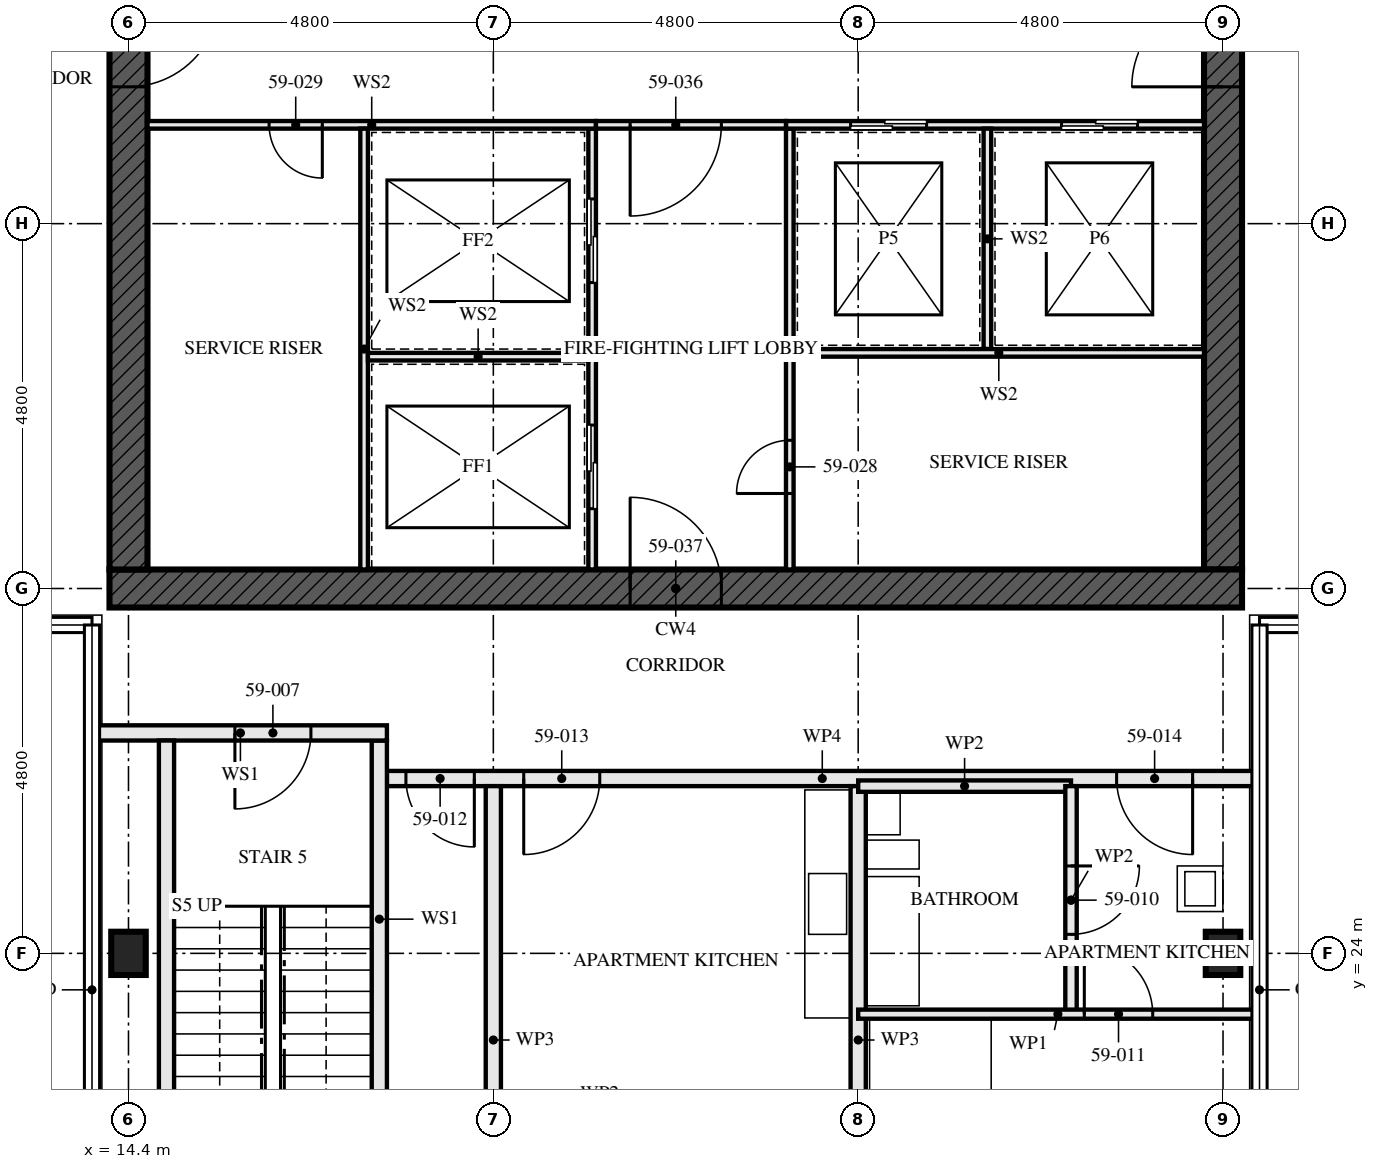
"""IFC4 building model, lengths in metres.
Left out: names, types, materials, properties, quantities, classifications, styles, units other than length and angle.
Written with IfcOpenShell. Run it as: python <this file> out.ifc"""

import sys

from ifc_helpers import new_model, si_unit, direction, frame, frame_2d, origin, origin_2d, place, context, subcontext, project, spatial, rectangle, i_section, extrude, element, fill, save


model = new_model("IFC4")
c1 = context("Model", 3, precision=1e-05, world=origin(), true_north=direction((0.0, 1.0)))
c2 = subcontext(c1, "Body", "Model", "MODEL_VIEW")
j1 = project(units=[si_unit("LENGTHUNIT", "METRE"), si_unit("PLANEANGLEUNIT", "RADIAN")], contexts=[c1])
p1 = place(None, origin())
s1 = spatial("IfcSite", under=j1, at=p1, CompositionType="ELEMENT")
p2 = place(p1, origin())
s2 = spatial("IfcBuilding", under=s1, at=p2, CompositionType="ELEMENT")
p3 = place(p2, frame((0.0, 0.0, 215.5)))
s3 = spatial("IfcBuildingStorey", under=s2, at=p3, CompositionType="ELEMENT", Elevation=215.5)
for number, where, z_axis, x_axis in (
    (1, (14.4, 24.0, 0.0), (0.0, 0.0, 1.0), (1.0, 0.0, 0.0)),
    (2, (28.8, 24.0, 0.0), (0.0, 0.0, 1.0), (1.0, 0.0, 0.0)),
):
    element("IfcColumn", number, at=place(p3, frame(where, z_axis=z_axis, x_axis=x_axis)), inside=s3, PredefinedType="COLUMN", context=c2, shape_type="SweptSolid", body=[
        extrude(i_section(OverallWidth=0.454, OverallDepth=0.569, WebThickness=0.078, FlangeThickness=0.125, FilletRadius=0.015, at=origin_2d()), origin(), (0.0, 0.0, 1.0), 3.5),
    ])
p4 = place(p3, frame((14.15, 28.8, -0.17), z_axis=(0.0, 0.0, 1.0), x_axis=(1.0, 0.0, 0.0)))
e3 = element("IfcWall", 3, at=p4, inside=s3, PredefinedType="SHEAR", context=c2, shape_type="SweptSolid", body=[
    extrude(rectangle(XDim=14.9, YDim=0.5, at=frame_2d((7.45, 0.0))), origin(), (0.0, 0.0, 1.0), 3.5),
])
p5 = place(p4, frame((6.85, 0.0, 0.17)))
e4 = element("IfcOpeningElement", 4, at=p5, cuts=e3, PredefinedType="OPENING", context=c2, shape_type="SweptSolid", body=[
    extrude(rectangle(XDim=1.2, YDim=2.1, at=frame_2d((0.6, 1.05))), frame((0.0, 0.26, 0.0), z_axis=(0.0, -1.0, 0.0), x_axis=(1.0, 0.0, 0.0)), (0.0, 0.0, 1.0), 0.521),
])
p6 = place(p3, frame((14.4, 42.95, -0.17), z_axis=(0.0, 0.0, 1.0), x_axis=(0.0, -1.0, 0.0)))
e5 = element("IfcWall", 5, at=p6, inside=s3, PredefinedType="SHEAR", context=c2, shape_type="SweptSolid", body=[
    extrude(rectangle(XDim=13.9, YDim=0.5, at=frame_2d((6.95, 0.0))), origin(), (0.0, 0.0, 1.0), 3.5),
])
p7 = place(p6, frame((6.35, 0.0, 0.17)))
e6 = element("IfcOpeningElement", 6, at=p7, cuts=e5, PredefinedType="OPENING", context=c2, shape_type="SweptSolid", body=[
    extrude(rectangle(XDim=1.2, YDim=2.1, at=frame_2d((0.6, 1.05))), frame((0.0, 0.26, 0.0), z_axis=(0.0, -1.0, 0.0), x_axis=(1.0, 0.0, 0.0)), (0.0, 0.0, 1.0), 0.521),
])
p8 = place(p3, frame((28.8, 29.05, -0.17), z_axis=(0.0, 0.0, 1.0), x_axis=(0.0, 1.0, 0.0)))
e7 = element("IfcWall", 7, at=p8, inside=s3, PredefinedType="SHEAR", context=c2, shape_type="SweptSolid", body=[
    extrude(rectangle(XDim=13.9, YDim=0.5, at=frame_2d((6.95, 0.0))), origin(), (0.0, 0.0, 1.0), 3.5),
])
p9 = place(p8, frame((6.35, 0.0, 0.17)))
e8 = element("IfcOpeningElement", 8, at=p9, cuts=e7, PredefinedType="OPENING", context=c2, shape_type="SweptSolid", body=[
    extrude(rectangle(XDim=1.2, YDim=2.1, at=frame_2d((0.6, 1.05))), frame((0.0, 0.26, 0.0), z_axis=(0.0, -1.0, 0.0), x_axis=(1.0, 0.0, 0.0)), (0.0, 0.0, 1.0), 0.521),
])
for number, where, z_axis, x_axis in (
    (9, (14.9, 22.1, 0.0), (0.0, 0.0, 1.0), (0.0, 1.0, 0.0)),
    (10, (17.7, 22.1, 0.0), (0.0, 0.0, 1.0), (0.0, 1.0, 0.0)),
):
    element("IfcWall", number, at=place(p3, frame(where, z_axis=z_axis, x_axis=x_axis)), inside=s3, PredefinedType="SOLIDWALL", context=c2, shape_type="SweptSolid", body=[
        extrude(rectangle(XDim=4.7, YDim=0.2, at=frame_2d((2.35, 0.0))), origin(), (0.0, 0.0, 1.0), 2.99),
    ])
p10 = place(p3, frame((13.945, 26.9, 0.0), z_axis=(0.0, 0.0, 1.0), x_axis=(1.0, 0.0, 0.0)))
e11 = element("IfcWall", 11, at=p10, inside=s3, PredefinedType="SOLIDWALL", context=c2, shape_type="SweptSolid", body=[
    extrude(rectangle(XDim=3.855, YDim=0.2, at=frame_2d((1.927, 0.0))), origin(), (0.0, 0.0, 1.0), 2.32),
])
p11 = place(p10, frame((1.855, 0.0, 0.0)))
e12 = element("IfcOpeningElement", 12, at=p11, cuts=e11, PredefinedType="OPENING", context=c2, shape_type="SweptSolid", body=[
    extrude(rectangle(XDim=1.0, YDim=2.1, at=frame_2d((0.5, 1.05))), frame((0.0, 0.111, 0.0), z_axis=(0.0, -1.0, 0.0), x_axis=(1.0, 0.0, 0.0)), (0.0, 0.0, 1.0), 0.221),
])
for number, where, z_axis, x_axis in (
    (13, (19.2, 19.52, 0.0), (0.0, 0.0, 1.0), (0.0, 1.0, 0.0)),
    (14, (24.0, 19.52, 0.0), (0.0, 0.0, 1.0), (0.0, 1.0, 0.0)),
):
    element("IfcWall", number, at=place(p3, frame(where, z_axis=z_axis, x_axis=x_axis)), inside=s3, PredefinedType="PARTITIONING", context=c2, shape_type="SweptSolid", body=[
        extrude(rectangle(XDim=6.68, YDim=0.2, at=frame_2d((3.34, 0.0))), origin(), (0.0, 0.0, 1.0), 2.55),
    ])
p12 = place(p3, frame((26.8, 23.2, 0.0), z_axis=(0.0, 0.0, 1.0), x_axis=(0.0, 1.0, 0.0)))
e15 = element("IfcWall", 15, at=p12, inside=s3, PredefinedType="PARTITIONING", context=c2, shape_type="SweptSolid", body=[
    extrude(rectangle(XDim=3.0, YDim=0.15, at=frame_2d((1.5, 0.0))), origin(), (0.0, 0.0, 1.0), 2.55),
])
p13 = place(p12, frame((1.05, 0.0, 0.0)))
e16 = element("IfcOpeningElement", 16, at=p13, cuts=e15, PredefinedType="OPENING", context=c2, shape_type="SweptSolid", body=[
    extrude(rectangle(XDim=0.9, YDim=2.1, at=frame_2d((0.45, 1.05))), frame((0.0, 0.085, 0.0), z_axis=(0.0, -1.0, 0.0), x_axis=(1.0, 0.0, 0.0)), (0.0, 0.0, 1.0), 0.171),
])
p14 = place(p3, frame((24.0, 26.2, 0.0), z_axis=(0.0, 0.0, 1.0), x_axis=(1.0, 0.0, 0.0)))
e17 = element("IfcWall", 17, at=p14, inside=s3, PredefinedType="PARTITIONING", context=c2, shape_type="SweptSolid", body=[
    extrude(rectangle(XDim=2.8, YDim=0.15, at=frame_2d((1.4, 0.0))), origin(), (0.0, 0.0, 1.0), 3.33),
])
p15 = place(p3, frame((24.0, 23.2, 0.0), z_axis=(0.0, 0.0, 1.0), x_axis=(1.0, 0.0, 0.0)))
e18 = element("IfcWall", 18, at=p15, inside=s3, PredefinedType="PARTITIONING", context=c2, shape_type="SweptSolid", body=[
    extrude(rectangle(XDim=5.255, YDim=0.12, at=frame_2d((2.627, 0.0))), origin(), (0.0, 0.0, 1.0), 2.32),
])
p16 = place(p15, frame((2.975, 0.0, 0.0)))
e19 = element("IfcOpeningElement", 19, at=p16, cuts=e18, PredefinedType="OPENING", context=c2, shape_type="SweptSolid", body=[
    extrude(rectangle(XDim=0.9, YDim=2.1, at=frame_2d((0.45, 1.05))), frame((0.0, 0.071, 0.0), z_axis=(0.0, -1.0, 0.0), x_axis=(1.0, 0.0, 0.0)), (0.0, 0.0, 1.0), 0.141),
])
p17 = place(p3, frame((17.8, 26.3, 0.0), z_axis=(0.0, 0.0, 1.0), x_axis=(1.0, 0.0, 0.0)))
e20 = element("IfcWall", 20, at=p17, inside=s3, PredefinedType="PARTITIONING", context=c2, shape_type="SweptSolid", body=[
    extrude(rectangle(XDim=11.455, YDim=0.2, at=frame_2d((5.728, 0.0))), origin(), (0.0, 0.0, 1.0), 2.32),
])
p18 = place(p17, frame((0.25, 0.0, 0.0)))
e21 = element("IfcOpeningElement", 21, at=p18, cuts=e20, PredefinedType="OPENING", context=c2, shape_type="SweptSolid", body=[
    extrude(rectangle(XDim=0.9, YDim=2.1, at=frame_2d((0.45, 1.05))), frame((0.0, 0.111, 0.0), z_axis=(0.0, -1.0, 0.0), x_axis=(1.0, 0.0, 0.0)), (0.0, 0.0, 1.0), 0.221),
])
p19 = place(p17, frame((1.8, 0.0, 0.0)))
e22 = element("IfcOpeningElement", 22, at=p19, cuts=e20, PredefinedType="OPENING", context=c2, shape_type="SweptSolid", body=[
    extrude(rectangle(XDim=1.0, YDim=2.1, at=frame_2d((0.5, 1.05))), frame((0.0, 0.111, 0.0), z_axis=(0.0, -1.0, 0.0), x_axis=(1.0, 0.0, 0.0)), (0.0, 0.0, 1.0), 0.221),
])
p20 = place(p17, frame((9.6, 0.0, 0.0)))
e23 = element("IfcOpeningElement", 23, at=p20, cuts=e20, PredefinedType="OPENING", context=c2, shape_type="SweptSolid", body=[
    extrude(rectangle(XDim=1.0, YDim=2.1, at=frame_2d((0.5, 1.05))), frame((0.0, 0.111, 0.0), z_axis=(0.0, -1.0, 0.0), x_axis=(1.0, 0.0, 0.0)), (0.0, 0.0, 1.0), 0.221),
])
p21 = place(p3, frame((20.5, 29.05, 0.0), z_axis=(0.0, 0.0, 1.0), x_axis=(0.0, 1.0, 0.0)))
e24 = element("IfcWall", 24, at=p21, inside=s3, PredefinedType="SOLIDWALL", context=c2, shape_type="SweptSolid", body=[
    extrude(rectangle(XDim=5.8, YDim=0.1, at=frame_2d((2.9, 0.0))), origin(), (0.0, 0.0, 1.0), 3.33),
])
p22 = place(p21, frame((0.8, 0.0, 0.0)))
e25 = element("IfcOpeningElement", 25, at=p22, cuts=e24, PredefinedType="OPENING", context=c2, shape_type="SweptSolid", body=[
    extrude(rectangle(XDim=1.1, YDim=2.3, at=frame_2d((0.55, 1.15))), frame((0.0, 0.061, 0.0), z_axis=(0.0, -1.0, 0.0), x_axis=(1.0, 0.0, 0.0)), (0.0, 0.0, 1.0), 0.121),
])
p23 = place(p21, frame((3.775, 0.0, 0.0)))
e26 = element("IfcOpeningElement", 26, at=p23, cuts=e24, PredefinedType="OPENING", context=c2, shape_type="SweptSolid", body=[
    extrude(rectangle(XDim=1.1, YDim=2.3, at=frame_2d((0.55, 1.15))), frame((0.0, 0.061, 0.0), z_axis=(0.0, -1.0, 0.0), x_axis=(1.0, 0.0, 0.0)), (0.0, 0.0, 1.0), 0.121),
])
p24 = place(p3, frame((23.1, 29.05, 0.0), z_axis=(0.0, 0.0, 1.0), x_axis=(0.0, 1.0, 0.0)))
e27 = element("IfcWall", 27, at=p24, inside=s3, PredefinedType="SOLIDWALL", context=c2, shape_type="SweptSolid", body=[
    extrude(rectangle(XDim=5.8, YDim=0.1, at=frame_2d((2.9, 0.0))), origin(), (0.0, 0.0, 1.0), 3.33),
])
p25 = place(p24, frame((1.0, 0.0, 0.0)))
e28 = element("IfcOpeningElement", 28, at=p25, cuts=e27, PredefinedType="OPENING", context=c2, shape_type="SweptSolid", body=[
    extrude(rectangle(XDim=0.7, YDim=2.1, at=frame_2d((0.35, 1.05))), frame((0.0, 0.061, 0.0), z_axis=(0.0, -1.0, 0.0), x_axis=(1.0, 0.0, 0.0)), (0.0, 0.0, 1.0), 0.121),
])
p26 = place(p3, frame((14.65, 34.9, 0.0), z_axis=(0.0, 0.0, 1.0), x_axis=(1.0, 0.0, 0.0)))
e29 = element("IfcWall", 29, at=p26, inside=s3, PredefinedType="SOLIDWALL", context=c2, shape_type="SweptSolid", body=[
    extrude(rectangle(XDim=5.9, YDim=0.1, at=frame_2d((2.95, 0.0))), origin(), (0.0, 0.0, 1.0), 3.33),
])
p27 = place(p26, frame((1.6, 0.0, 0.0)))
e30 = element("IfcOpeningElement", 30, at=p27, cuts=e29, PredefinedType="OPENING", context=c2, shape_type="SweptSolid", body=[
    extrude(rectangle(XDim=0.7, YDim=2.1, at=frame_2d((0.35, 1.05))), frame((0.0, 0.061, 0.0), z_axis=(0.0, -1.0, 0.0), x_axis=(1.0, 0.0, 0.0)), (0.0, 0.0, 1.0), 0.121),
])
p28 = place(p3, frame((23.05, 34.9, 0.0), z_axis=(0.0, 0.0, 1.0), x_axis=(1.0, 0.0, 0.0)))
e31 = element("IfcWall", 31, at=p28, inside=s3, PredefinedType="SOLIDWALL", context=c2, shape_type="SweptSolid", body=[
    extrude(rectangle(XDim=5.5, YDim=0.1, at=frame_2d((2.75, 0.0))), origin(), (0.0, 0.0, 1.0), 3.33),
])
p29 = place(p28, frame((0.85, 0.0, 0.0)))
e32 = element("IfcOpeningElement", 32, at=p29, cuts=e31, PredefinedType="OPENING", context=c2, shape_type="SweptSolid", body=[
    extrude(rectangle(XDim=1.0, YDim=2.1, at=frame_2d((0.5, 1.05))), frame((0.0, 0.061, 0.0), z_axis=(0.0, -1.0, 0.0), x_axis=(1.0, 0.0, 0.0)), (0.0, 0.0, 1.0), 0.121),
])
p30 = place(p28, frame((3.625, 0.0, 0.0)))
e33 = element("IfcOpeningElement", 33, at=p30, cuts=e31, PredefinedType="OPENING", context=c2, shape_type="SweptSolid", body=[
    extrude(rectangle(XDim=1.0, YDim=2.1, at=frame_2d((0.5, 1.05))), frame((0.0, 0.061, 0.0), z_axis=(0.0, -1.0, 0.0), x_axis=(1.0, 0.0, 0.0)), (0.0, 0.0, 1.0), 0.121),
])
p31 = place(p3, frame((20.55, 34.9, 0.0), z_axis=(0.0, 0.0, 1.0), x_axis=(1.0, 0.0, 0.0)))
e34 = element("IfcWall", 34, at=p31, inside=s3, PredefinedType="SOLIDWALL", context=c2, shape_type="SweptSolid", body=[
    extrude(rectangle(XDim=2.5, YDim=0.1, at=frame_2d((1.25, 0.0))), origin(), (0.0, 0.0, 1.0), 3.33),
])
p32 = place(p31, frame((0.45, 0.0, 0.0)))
e35 = element("IfcOpeningElement", 35, at=p32, cuts=e34, PredefinedType="OPENING", context=c2, shape_type="SweptSolid", body=[
    extrude(rectangle(XDim=1.2, YDim=2.1, at=frame_2d((0.6, 1.05))), frame((0.0, 0.061, 0.0), z_axis=(0.0, -1.0, 0.0), x_axis=(1.0, 0.0, 0.0)), (0.0, 0.0, 1.0), 0.121),
])
p33 = place(p3, frame((17.5, 29.05, 0.0), z_axis=(0.0, 0.0, 1.0), x_axis=(0.0, 1.0, 0.0)))
e36 = element("IfcWall", 36, at=p33, inside=s3, PredefinedType="SOLIDWALL", context=c2, shape_type="SweptSolid", body=[
    extrude(rectangle(XDim=5.8, YDim=0.1, at=frame_2d((2.9, 0.0))), origin(), (0.0, 0.0, 1.0), 3.33),
])
p34 = place(p3, frame((17.55, 31.85, 0.0), z_axis=(0.0, 0.0, 1.0), x_axis=(1.0, 0.0, 0.0)))
e37 = element("IfcWall", 37, at=p34, inside=s3, PredefinedType="SOLIDWALL", context=c2, shape_type="SweptSolid", body=[
    extrude(rectangle(XDim=2.9, YDim=0.1, at=frame_2d((1.45, 0.0))), origin(), (0.0, 0.0, 1.0), 3.33),
])
p35 = place(p3, frame((25.7, 31.95, 0.0), z_axis=(0.0, 0.0, 1.0), x_axis=(0.0, 1.0, 0.0)))
e38 = element("IfcWall", 38, at=p35, inside=s3, PredefinedType="SOLIDWALL", context=c2, shape_type="SweptSolid", body=[
    extrude(rectangle(XDim=2.9, YDim=0.1, at=frame_2d((1.45, 0.0))), origin(), (0.0, 0.0, 1.0), 3.33),
])
p36 = place(p3, frame((23.15, 31.9, 0.0), z_axis=(0.0, 0.0, 1.0), x_axis=(1.0, 0.0, 0.0)))
e39 = element("IfcWall", 39, at=p36, inside=s3, PredefinedType="SOLIDWALL", context=c2, shape_type="SweptSolid", body=[
    extrude(rectangle(XDim=5.4, YDim=0.1, at=frame_2d((2.7, 0.0))), origin(), (0.0, 0.0, 1.0), 3.33),
])
p37 = place(p11, frame((1.0, 0.0, 0.0), z_axis=(0.0, 0.0, 1.0), x_axis=(-1.0, 0.0, 0.0)))
e40 = element("IfcDoor", 40, at=p37, inside=s3, OperationType="SINGLE_SWING_LEFT", PredefinedType="DOOR", context=c2, shape_type="SweptSolid", body=[
    extrude(rectangle(XDim=1.0, YDim=2.1, at=frame_2d((0.5, 1.05))), frame((0.0, 0.032, 0.0), z_axis=(0.0, -1.0, 0.0), x_axis=(1.0, 0.0, 0.0)), (0.0, 0.0, 1.0), 0.064),
])
fill(e12, e40)
p38 = place(p13, frame((0.9, 0.0, 0.0), z_axis=(0.0, 0.0, 1.0), x_axis=(-1.0, 0.0, 0.0)))
e41 = element("IfcDoor", 41, at=p38, inside=s3, OperationType="SINGLE_SWING_RIGHT", PredefinedType="DOOR", context=c2, shape_type="SweptSolid", body=[
    extrude(rectangle(XDim=0.9, YDim=2.1, at=frame_2d((0.45, 1.05))), frame((0.0, 0.022, 0.0), z_axis=(0.0, -1.0, 0.0), x_axis=(1.0, 0.0, 0.0)), (0.0, 0.0, 1.0), 0.044),
])
fill(e16, e41)
p39 = place(p16, origin())
e42 = element("IfcDoor", 42, at=p39, inside=s3, OperationType="SINGLE_SWING_RIGHT", PredefinedType="DOOR", context=c2, shape_type="SweptSolid", body=[
    extrude(rectangle(XDim=0.9, YDim=2.1, at=frame_2d((0.45, 1.05))), frame((0.0, 0.022, 0.0), z_axis=(0.0, -1.0, 0.0), x_axis=(1.0, 0.0, 0.0)), (0.0, 0.0, 1.0), 0.044),
])
fill(e19, e42)
p40 = place(p18, frame((0.9, 0.0, 0.0), z_axis=(0.0, 0.0, 1.0), x_axis=(-1.0, 0.0, 0.0)))
e43 = element("IfcDoor", 43, at=p40, inside=s3, OperationType="SINGLE_SWING_RIGHT", PredefinedType="DOOR", context=c2, shape_type="SweptSolid", body=[
    extrude(rectangle(XDim=0.9, YDim=2.1, at=frame_2d((0.45, 1.05))), frame((0.0, 0.027, 0.0), z_axis=(0.0, -1.0, 0.0), x_axis=(1.0, 0.0, 0.0)), (0.0, 0.0, 1.0), 0.054),
])
fill(e21, e43)
p41 = place(p19, frame((1.0, 0.0, 0.0), z_axis=(0.0, 0.0, 1.0), x_axis=(-1.0, 0.0, 0.0)))
e44 = element("IfcDoor", 44, at=p41, inside=s3, OperationType="SINGLE_SWING_LEFT", PredefinedType="DOOR", context=c2, shape_type="SweptSolid", body=[
    extrude(rectangle(XDim=1.0, YDim=2.1, at=frame_2d((0.5, 1.05))), frame((0.0, 0.027, 0.0), z_axis=(0.0, -1.0, 0.0), x_axis=(1.0, 0.0, 0.0)), (0.0, 0.0, 1.0), 0.054),
])
fill(e22, e44)
p42 = place(p20, frame((1.0, 0.0, 0.0), z_axis=(0.0, 0.0, 1.0), x_axis=(-1.0, 0.0, 0.0)))
e45 = element("IfcDoor", 45, at=p42, inside=s3, OperationType="SINGLE_SWING_RIGHT", PredefinedType="DOOR", context=c2, shape_type="SweptSolid", body=[
    extrude(rectangle(XDim=1.0, YDim=2.1, at=frame_2d((0.5, 1.05))), frame((0.0, 0.027, 0.0), z_axis=(0.0, -1.0, 0.0), x_axis=(1.0, 0.0, 0.0)), (0.0, 0.0, 1.0), 0.054),
])
fill(e23, e45)
p43 = place(p22, origin())
e46 = element("IfcDoor", 46, at=p43, inside=s3, OperationType="SLIDING_TO_LEFT", PredefinedType="DOOR", context=c2, shape_type="SweptSolid", body=[
    extrude(rectangle(XDim=1.1, YDim=2.3, at=frame_2d((0.55, 1.15))), frame((0.0, 0.05, 0.0), z_axis=(0.0, -1.0, 0.0), x_axis=(1.0, 0.0, 0.0)), (0.0, 0.0, 1.0), 0.1),
])
fill(e25, e46)
p44 = place(p23, origin())
e47 = element("IfcDoor", 47, at=p44, inside=s3, OperationType="SLIDING_TO_LEFT", PredefinedType="DOOR", context=c2, shape_type="SweptSolid", body=[
    extrude(rectangle(XDim=1.1, YDim=2.3, at=frame_2d((0.55, 1.15))), frame((0.0, 0.05, 0.0), z_axis=(0.0, -1.0, 0.0), x_axis=(1.0, 0.0, 0.0)), (0.0, 0.0, 1.0), 0.1),
])
fill(e26, e47)
p45 = place(p25, origin())
e48 = element("IfcDoor", 48, at=p45, inside=s3, OperationType="SINGLE_SWING_RIGHT", PredefinedType="DOOR", context=c2, shape_type="SweptSolid", body=[
    extrude(rectangle(XDim=0.7, YDim=2.1, at=frame_2d((0.35, 1.05))), frame((0.0, 0.027, 0.0), z_axis=(0.0, -1.0, 0.0), x_axis=(1.0, 0.0, 0.0)), (0.0, 0.0, 1.0), 0.054),
])
fill(e28, e48)
p46 = place(p27, frame((0.7, 0.0, 0.0), z_axis=(0.0, 0.0, 1.0), x_axis=(-1.0, 0.0, 0.0)))
e49 = element("IfcDoor", 49, at=p46, inside=s3, OperationType="SINGLE_SWING_RIGHT", PredefinedType="DOOR", context=c2, shape_type="SweptSolid", body=[
    extrude(rectangle(XDim=0.7, YDim=2.1, at=frame_2d((0.35, 1.05))), frame((0.0, 0.027, 0.0), z_axis=(0.0, -1.0, 0.0), x_axis=(1.0, 0.0, 0.0)), (0.0, 0.0, 1.0), 0.054),
])
fill(e30, e49)
p47 = place(p29, origin())
e50 = element("IfcDoor", 50, at=p47, inside=s3, OperationType="SLIDING_TO_LEFT", PredefinedType="DOOR", context=c2, shape_type="SweptSolid", body=[
    extrude(rectangle(XDim=1.0, YDim=2.1, at=frame_2d((0.5, 1.05))), frame((0.0, 0.05, 0.0), z_axis=(0.0, -1.0, 0.0), x_axis=(1.0, 0.0, 0.0)), (0.0, 0.0, 1.0), 0.1),
])
fill(e32, e50)
p48 = place(p30, origin())
e51 = element("IfcDoor", 51, at=p48, inside=s3, OperationType="SLIDING_TO_LEFT", PredefinedType="DOOR", context=c2, shape_type="SweptSolid", body=[
    extrude(rectangle(XDim=1.0, YDim=2.1, at=frame_2d((0.5, 1.05))), frame((0.0, 0.05, 0.0), z_axis=(0.0, -1.0, 0.0), x_axis=(1.0, 0.0, 0.0)), (0.0, 0.0, 1.0), 0.1),
])
fill(e33, e51)
p49 = place(p32, frame((1.2, 0.0, 0.0), z_axis=(0.0, 0.0, 1.0), x_axis=(-1.0, 0.0, 0.0)))
e52 = element("IfcDoor", 52, at=p49, inside=s3, OperationType="SINGLE_SWING_LEFT", PredefinedType="DOOR", context=c2, shape_type="SweptSolid", body=[
    extrude(rectangle(XDim=1.2, YDim=2.1, at=frame_2d((0.6, 1.05))), frame((0.0, 0.027, 0.0), z_axis=(0.0, -1.0, 0.0), x_axis=(1.0, 0.0, 0.0)), (0.0, 0.0, 1.0), 0.054),
])
fill(e35, e52)
p50 = place(p5, origin())
e53 = element("IfcDoor", 53, at=p50, inside=s3, OperationType="SINGLE_SWING_LEFT", PredefinedType="DOOR", context=c2, shape_type="SweptSolid", body=[
    extrude(rectangle(XDim=1.2, YDim=2.1, at=frame_2d((0.6, 1.05))), frame((0.0, 0.027, 0.0), z_axis=(0.0, -1.0, 0.0), x_axis=(1.0, 0.0, 0.0)), (0.0, 0.0, 1.0), 0.054),
])
fill(e4, e53)
p51 = place(p7, origin())
e54 = element("IfcDoor", 54, at=p51, inside=s3, OperationType="SINGLE_SWING_LEFT", PredefinedType="DOOR", context=c2, shape_type="SweptSolid", body=[
    extrude(rectangle(XDim=1.2, YDim=2.1, at=frame_2d((0.6, 1.05))), frame((0.0, 0.027, 0.0), z_axis=(0.0, -1.0, 0.0), x_axis=(1.0, 0.0, 0.0)), (0.0, 0.0, 1.0), 0.054),
])
fill(e6, e54)
p52 = place(p9, origin())
e55 = element("IfcDoor", 55, at=p52, inside=s3, OperationType="SINGLE_SWING_LEFT", PredefinedType="DOOR", context=c2, shape_type="SweptSolid", body=[
    extrude(rectangle(XDim=1.2, YDim=2.1, at=frame_2d((0.6, 1.05))), frame((0.0, 0.027, 0.0), z_axis=(0.0, -1.0, 0.0), x_axis=(1.0, 0.0, 0.0)), (0.0, 0.0, 1.0), 0.054),
])
fill(e8, e55)
save(model, sys.argv[1])
